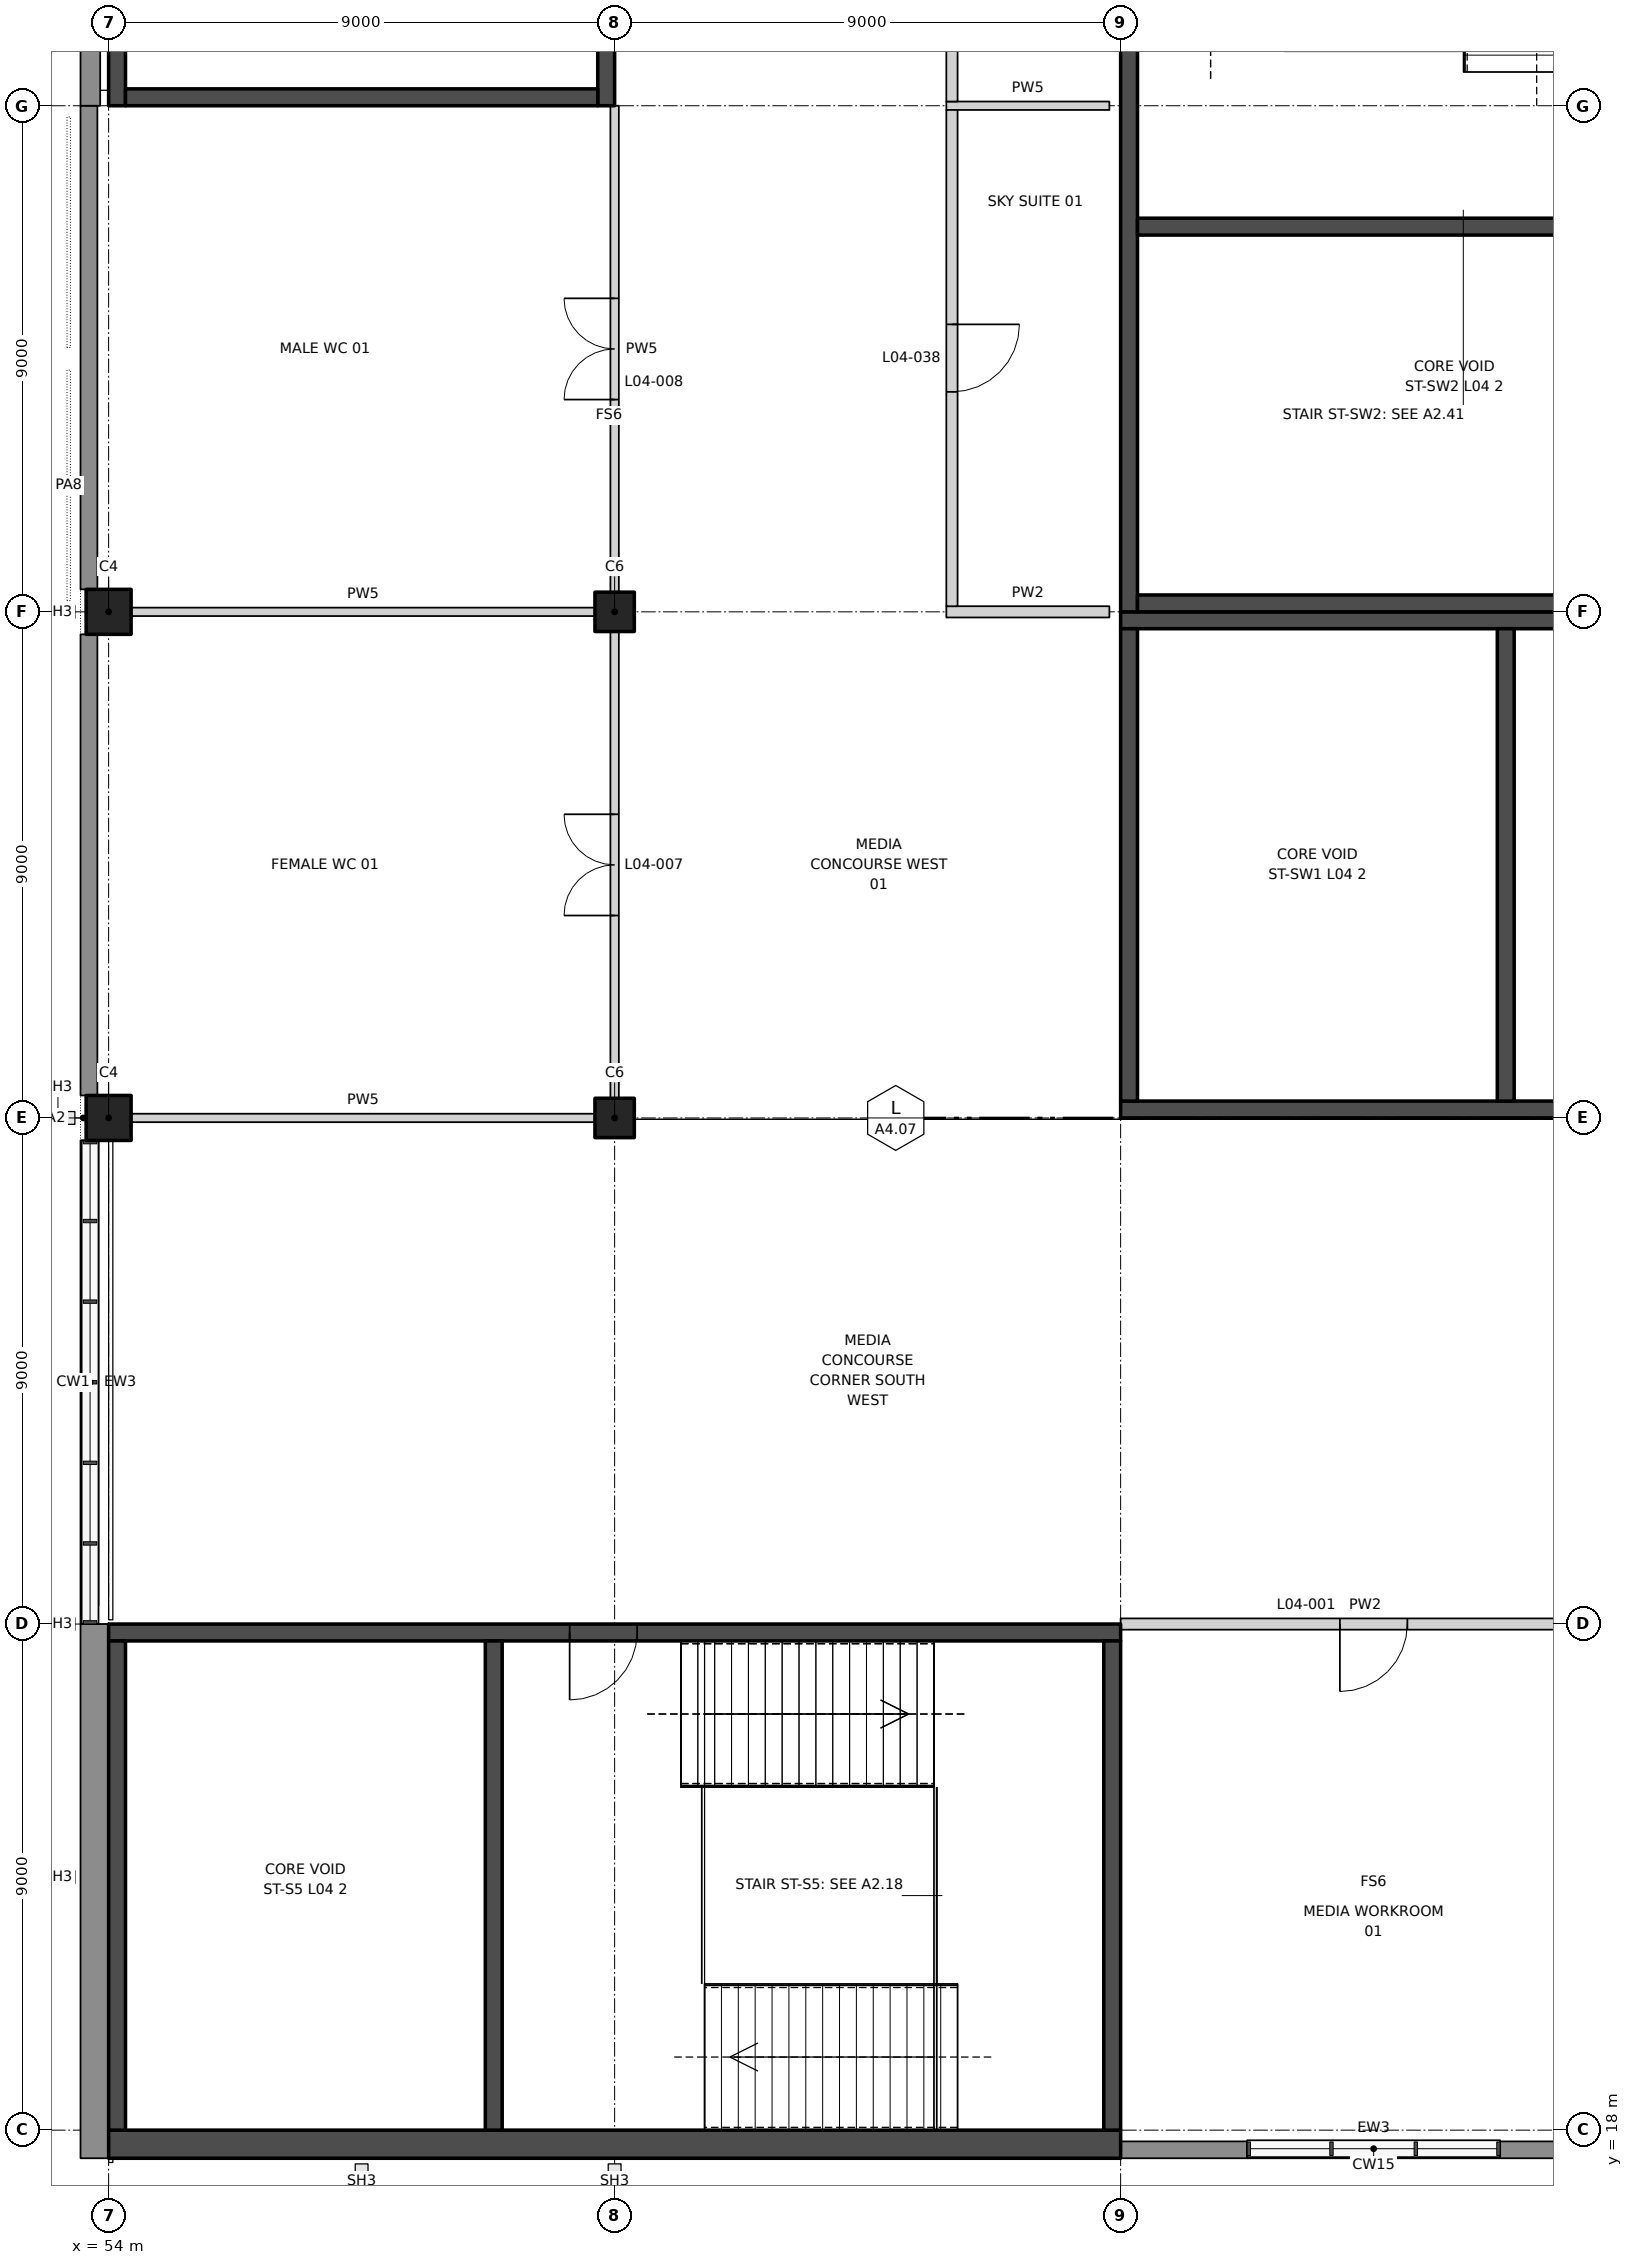
"""IFC4 building model, lengths in metres.
Left out: names, types, materials, properties, quantities, classifications, styles, units other than length and angle.
Written with IfcOpenShell. Run it as: python <this file> out.ifc"""

import sys

from ifc_helpers import new_model, si_unit, direction, frame, frame_2d, origin, origin_2d, place, context, subcontext, project, spatial, rectangle, extrude, element, fill, save


model = new_model("IFC4")
c1 = context("Model", 3, precision=1e-05, world=origin(), true_north=direction((0.0, 1.0)))
c2 = subcontext(c1, "Body", "Model", "MODEL_VIEW")
j1 = project(units=[si_unit("LENGTHUNIT", "METRE"), si_unit("PLANEANGLEUNIT", "RADIAN")], contexts=[c1])
p1 = place(None, origin())
s1 = spatial("IfcSite", under=j1, at=p1, CompositionType="ELEMENT")
p2 = place(p1, origin())
s2 = spatial("IfcBuilding", under=s1, at=p2, CompositionType="ELEMENT")
p3 = place(p2, frame((0.0, 0.0, 28.0)))
s3 = spatial("IfcBuildingStorey", under=s2, at=p3, CompositionType="ELEMENT", Elevation=28.0)
for number, where, z_axis, x_axis in (
    (1, (54.0, 36.0, 0.0), (0.0, 0.0, 1.0), (1.0, 0.0, 0.0)),
    (2, (54.0, 45.0, 0.0), (0.0, 0.0, 1.0), (1.0, 0.0, 0.0)),
):
    element("IfcColumn", number, at=place(p3, frame(where, z_axis=z_axis, x_axis=x_axis)), inside=s3, PredefinedType="COLUMN", context=c2, shape_type="SweptSolid", body=[
        extrude(rectangle(XDim=0.8, YDim=0.8, at=origin_2d()), origin(), (0.0, 0.0, 1.0), 5.5),
    ])
for number, where, z_axis, x_axis in (
    (3, (63.0, 36.0, 0.0), (0.0, 0.0, 1.0), (1.0, 0.0, 0.0)),
    (4, (63.0, 45.0, 0.0), (0.0, 0.0, 1.0), (1.0, 0.0, 0.0)),
):
    element("IfcColumn", number, at=place(p3, frame(where, z_axis=z_axis, x_axis=x_axis)), inside=s3, PredefinedType="COLUMN", context=c2, shape_type="SweptSolid", body=[
        extrude(rectangle(XDim=0.7, YDim=0.7, at=origin_2d()), origin(), (0.0, 0.0, 1.0), 5.5),
    ])
p4 = place(p3, frame((72.0, 27.0, 0.0), z_axis=(0.0, 0.0, 1.0), x_axis=(1.0, 0.0, 0.0)))
e5 = element("IfcWall", 5, at=p4, inside=s3, PredefinedType="PARTITIONING", context=c2, shape_type="SweptSolid", body=[
    extrude(rectangle(XDim=8.7, YDim=0.2, at=frame_2d((4.35, 0.0))), origin(), (0.0, 0.0, 1.0), 4.2),
])
p5 = place(p4, frame((3.9, 0.0, 0.0)))
e6 = element("IfcOpeningElement", 6, at=p5, cuts=e5, PredefinedType="OPENING", context=c2, shape_type="SweptSolid", body=[
    extrude(rectangle(XDim=1.2, YDim=2.1, at=frame_2d((0.6, 1.05))), frame((0.0, 0.11, 0.0), z_axis=(0.0, -1.0, 0.0), x_axis=(1.0, 0.0, 0.0)), (0.0, 0.0, 1.0), 0.22),
])
p6 = place(p3, frame((54.4, 36.0, 0.0), z_axis=(0.0, 0.0, 1.0), x_axis=(1.0, 0.0, 0.0)))
e7 = element("IfcWall", 7, at=p6, inside=s3, PredefinedType="PARTITIONING", context=c2, shape_type="SweptSolid", body=[
    extrude(rectangle(XDim=8.25, YDim=0.15, at=frame_2d((4.125, 0.0))), origin(), (0.0, 0.0, 1.0), 4.3),
])
p7 = place(p3, frame((54.4, 45.0, 0.0), z_axis=(0.0, 0.0, 1.0), x_axis=(1.0, 0.0, 0.0)))
e8 = element("IfcWall", 8, at=p7, inside=s3, PredefinedType="PARTITIONING", context=c2, shape_type="SweptSolid", body=[
    extrude(rectangle(XDim=8.25, YDim=0.15, at=frame_2d((4.125, 0.0))), origin(), (0.0, 0.0, 1.0), 9.5),
])
p8 = place(p3, frame((68.9, 45.0, 0.0), z_axis=(0.0, 0.0, 1.0), x_axis=(1.0, 0.0, 0.0)))
e9 = element("IfcWall", 9, at=p8, inside=s3, PredefinedType="PARTITIONING", context=c2, shape_type="SweptSolid", body=[
    extrude(rectangle(XDim=2.9, YDim=0.2, at=frame_2d((1.45, 0.0))), origin(), (0.0, 0.0, 1.0), 4.2),
])
p9 = place(p3, frame((68.9, 54.0, 0.0), z_axis=(0.0, 0.0, 1.0), x_axis=(1.0, 0.0, 0.0)))
e10 = element("IfcWall", 10, at=p9, inside=s3, PredefinedType="PARTITIONING", context=c2, shape_type="SweptSolid", body=[
    extrude(rectangle(XDim=2.9, YDim=0.15, at=frame_2d((1.45, 0.0))), origin(), (0.0, 0.0, 1.0), 4.2),
])
p10 = place(p3, frame((63.0, 36.35, 0.0), z_axis=(0.0, 0.0, 1.0), x_axis=(0.0, 1.0, 0.0)))
e11 = element("IfcWall", 11, at=p10, inside=s3, PredefinedType="PARTITIONING", context=c2, shape_type="SweptSolid", body=[
    extrude(rectangle(XDim=8.3, YDim=0.15, at=frame_2d((4.15, 0.0))), origin(), (0.0, 0.0, 1.0), 4.2),
])
p11 = place(p10, frame((3.25, 0.0, 0.0)))
e12 = element("IfcOpeningElement", 12, at=p11, cuts=e11, PredefinedType="OPENING", context=c2, shape_type="SweptSolid", body=[
    extrude(rectangle(XDim=1.8, YDim=2.1, at=frame_2d((0.9, 1.05))), frame((0.0, 0.085, 0.0), z_axis=(0.0, -1.0, 0.0), x_axis=(1.0, 0.0, 0.0)), (0.0, 0.0, 1.0), 0.17),
])
p12 = place(p3, frame((63.0, 45.35, 0.0), z_axis=(0.0, 0.0, 1.0), x_axis=(0.0, 1.0, 0.0)))
e13 = element("IfcWall", 13, at=p12, inside=s3, PredefinedType="PARTITIONING", context=c2, shape_type="SweptSolid", body=[
    extrude(rectangle(XDim=8.65, YDim=0.15, at=frame_2d((4.325, 0.0))), origin(), (0.0, 0.0, 1.0), 4.2),
])
p13 = place(p12, frame((3.425, 0.0, 0.0)))
e14 = element("IfcOpeningElement", 14, at=p13, cuts=e13, PredefinedType="OPENING", context=c2, shape_type="SweptSolid", body=[
    extrude(rectangle(XDim=1.8, YDim=2.1, at=frame_2d((0.9, 1.05))), frame((0.0, 0.085, 0.0), z_axis=(0.0, -1.0, 0.0), x_axis=(1.0, 0.0, 0.0)), (0.0, 0.0, 1.0), 0.17),
])
p14 = place(p3, frame((69.0, 45.1, 0.0), z_axis=(0.0, 0.0, 1.0), x_axis=(0.0, 1.0, 0.0)))
e15 = element("IfcWall", 15, at=p14, inside=s3, PredefinedType="PARTITIONING", context=c2, shape_type="SweptSolid", body=[
    extrude(rectangle(XDim=8.825, YDim=0.2, at=frame_2d((4.413, 0.0))), origin(), (0.0, 0.0, 1.0), 5.5),
])
p15 = place(p14, frame((3.812, 0.0, 0.0)))
e16 = element("IfcOpeningElement", 16, at=p15, cuts=e15, PredefinedType="OPENING", context=c2, shape_type="SweptSolid", body=[
    extrude(rectangle(XDim=1.2, YDim=2.1, at=frame_2d((0.6, 1.05))), frame((0.0, 0.11, 0.0), z_axis=(0.0, -1.0, 0.0), x_axis=(1.0, 0.0, 0.0)), (0.0, 0.0, 1.0), 0.22),
])
p16 = place(p3, frame((69.0, 54.075, 0.0), z_axis=(0.0, 0.0, 1.0), x_axis=(0.0, 1.0, 0.0)))
e17 = element("IfcWall", 17, at=p16, inside=s3, PredefinedType="PARTITIONING", context=c2, shape_type="SweptSolid", body=[
    extrude(rectangle(XDim=8.85, YDim=0.2, at=frame_2d((4.425, 0.0))), origin(), (0.0, 0.0, 1.0), 5.5),
])
p17 = place(p16, frame((3.825, 0.0, 0.0)))
e18 = element("IfcOpeningElement", 18, at=p17, cuts=e17, PredefinedType="OPENING", context=c2, shape_type="SweptSolid", body=[
    extrude(rectangle(XDim=1.2, YDim=2.1, at=frame_2d((0.6, 1.05))), frame((0.0, 0.11, 0.0), z_axis=(0.0, -1.0, 0.0), x_axis=(1.0, 0.0, 0.0)), (0.0, 0.0, 1.0), 0.22),
])
for number, where, z_axis, x_axis in (
    (19, (72.0, 17.65, 0.0), (0.0, 0.0, 1.0), (1.0, 0.0, 0.0)),
    (20, (78.75, 17.65, 0.0), (0.0, 0.0, 1.0), (1.0, 0.0, 0.0)),
):
    element("IfcWall", number, at=place(p3, frame(where, z_axis=z_axis, x_axis=x_axis)), inside=s3, PredefinedType="SOLIDWALL", context=c2, shape_type="SweptSolid", body=[
        extrude(rectangle(XDim=2.25, YDim=0.3, at=frame_2d((1.125, 0.0))), origin(), (0.0, 0.0, 1.0), 4.9),
    ])
p18 = place(p3, frame((74.25, 17.65, 0.0), z_axis=(0.0, 0.0, 1.0), x_axis=(1.0, 0.0, 0.0)))
e21 = element("IfcWall", 21, at=p18, inside=s3, PredefinedType="SOLIDWALL", context=c2, shape_type="SweptSolid", body=[
    extrude(rectangle(XDim=4.5, YDim=0.3, at=frame_2d((2.25, 0.0))), origin(), (0.0, 0.0, 1.0), 1.0),
])
p19 = place(p3, frame((53.75, 27.0, 0.0), z_axis=(0.0, 0.0, 1.0), x_axis=(0.0, -1.0, 0.0)))
e22 = element("IfcWall", 22, at=p19, inside=s3, PredefinedType="SOLIDWALL", context=c2, shape_type="SweptSolid", body=[
    extrude(rectangle(XDim=9.5, YDim=0.5, at=frame_2d((4.75, 0.0))), origin(), (0.0, 0.0, 1.0), 5.5),
])
p20 = place(p3, frame((53.65, 35.6, 0.0), z_axis=(0.0, 0.0, 1.0), x_axis=(0.0, -1.0, 0.0)))
e23 = element("IfcWall", 23, at=p20, inside=s3, PredefinedType="SOLIDWALL", context=c2, shape_type="SweptSolid", body=[
    extrude(rectangle(XDim=8.6, YDim=0.3, at=frame_2d((4.3, 0.0))), origin(), (0.0, 0.0, 1.0), 1.0),
])
p21 = place(p3, frame((53.65, 44.6, 0.0), z_axis=(0.0, 0.0, 1.0), x_axis=(0.0, -1.0, 0.0)))
e24 = element("IfcWall", 24, at=p21, inside=s3, PredefinedType="SOLIDWALL", context=c2, shape_type="SweptSolid", body=[
    extrude(rectangle(XDim=8.2, YDim=0.3, at=frame_2d((4.1, 0.0))), origin(), (0.0, 0.0, 1.0), 5.5),
])
p22 = place(p3, frame((53.65, 54.0, 0.0), z_axis=(0.0, 0.0, 1.0), x_axis=(0.0, -1.0, 0.0)))
e25 = element("IfcWall", 25, at=p22, inside=s3, PredefinedType="SOLIDWALL", context=c2, shape_type="SweptSolid", body=[
    extrude(rectangle(XDim=8.6, YDim=0.3, at=frame_2d((4.3, 0.0))), origin(), (0.0, 0.0, 1.0), 5.5),
])
p23 = place(p3, frame((53.675, 63.0, 0.0), z_axis=(0.0, 0.0, 1.0), x_axis=(0.0, -1.0, 0.0)))
e26 = element("IfcWall", 26, at=p23, inside=s3, PredefinedType="SOLIDWALL", context=c2, shape_type="SweptSolid", body=[
    extrude(rectangle(XDim=9.0, YDim=0.35, at=frame_2d((4.5, 0.0))), origin(), (0.0, 0.0, 1.0), 5.5),
])
p24 = place(p3, frame((72.0, 26.85, 0.0), z_axis=(0.0, 0.0, 1.0), x_axis=(-1.0, 0.0, 0.0)))
e27 = element("IfcWall", 27, at=p24, inside=s3, PredefinedType="SHEAR", context=c2, shape_type="SweptSolid", body=[
    extrude(rectangle(XDim=18.0, YDim=0.3, at=frame_2d((9.0, 0.0))), origin(), (0.0, 0.0, 1.0), 5.5),
])
p25 = place(p24, frame((8.6, 0.0, 0.0)))
e28 = element("IfcOpeningElement", 28, at=p25, cuts=e27, PredefinedType="OPENING", context=c2, shape_type="SweptSolid", body=[
    extrude(rectangle(XDim=1.2, YDim=2.1, at=frame_2d((0.6, 1.05))), frame((0.0, 0.16, 0.0), z_axis=(0.0, -1.0, 0.0), x_axis=(1.0, 0.0, 0.0)), (0.0, 0.0, 1.0), 0.32),
])
p26 = place(p3, frame((72.0, 17.75, 0.0), z_axis=(0.0, 0.0, 1.0), x_axis=(-1.0, 0.0, 0.0)))
e29 = element("IfcWall", 29, at=p26, inside=s3, PredefinedType="SHEAR", context=c2, shape_type="SweptSolid", body=[
    extrude(rectangle(XDim=18.0, YDim=0.5, at=frame_2d((9.0, 0.0))), origin(), (0.0, 0.0, 1.0), 5.5),
])
for number, where, z_axis, x_axis in (
    (30, (71.85, 26.7, 0.0), (0.0, 0.0, 1.0), (0.0, -1.0, 0.0)),
    (31, (54.15, 26.7, 0.0), (0.0, 0.0, 1.0), (0.0, -1.0, 0.0)),
    (32, (60.85, 26.7, 0.0), (0.0, 0.0, 1.0), (0.0, -1.0, 0.0)),
):
    element("IfcWall", number, at=place(p3, frame(where, z_axis=z_axis, x_axis=x_axis)), inside=s3, PredefinedType="SHEAR", context=c2, shape_type="SweptSolid", body=[
        extrude(rectangle(XDim=8.7, YDim=0.3, at=frame_2d((4.35, 0.0))), origin(), (0.0, 0.0, 1.0), 5.5),
    ])
p27 = place(p3, frame((62.85, 54.0, 0.0), z_axis=(0.0, 0.0, 1.0), x_axis=(0.0, 1.0, 0.0)))
e33 = element("IfcWall", 33, at=p27, inside=s3, PredefinedType="SHEAR", context=c2, shape_type="SweptSolid", body=[
    extrude(rectangle(XDim=18.0, YDim=0.3, at=frame_2d((9.0, 0.0))), origin(), (0.0, 0.0, 1.0), 5.5),
])
p28 = place(p27, frame((1.5, 0.0, 0.0)))
e34 = element("IfcOpeningElement", 34, at=p28, cuts=e33, PredefinedType="OPENING", context=c2, shape_type="SweptSolid", body=[
    extrude(rectangle(XDim=1.2, YDim=2.1, at=frame_2d((0.6, 1.05))), frame((0.0, 0.16, 0.0), z_axis=(0.0, -1.0, 0.0), x_axis=(1.0, 0.0, 0.0)), (0.0, 0.0, 1.0), 0.32),
])
p29 = place(p3, frame((54.15, 54.0, 0.0), z_axis=(0.0, 0.0, 1.0), x_axis=(0.0, 1.0, 0.0)))
e35 = element("IfcWall", 35, at=p29, inside=s3, PredefinedType="SHEAR", context=c2, shape_type="SweptSolid", body=[
    extrude(rectangle(XDim=18.0, YDim=0.3, at=frame_2d((9.0, 0.0))), origin(), (0.0, 0.0, 1.0), 5.5),
])
p30 = place(p3, frame((62.7, 54.15, 0.0), z_axis=(0.0, 0.0, 1.0), x_axis=(-1.0, 0.0, 0.0)))
e36 = element("IfcWall", 36, at=p30, inside=s3, PredefinedType="SHEAR", context=c2, shape_type="SweptSolid", body=[
    extrude(rectangle(XDim=8.4, YDim=0.3, at=frame_2d((4.2, 0.0))), origin(), (0.0, 0.0, 1.0), 5.5),
])
p31 = place(p3, frame((90.0, 44.85, 0.0), z_axis=(0.0, 0.0, 1.0), x_axis=(-1.0, 0.0, 0.0)))
e37 = element("IfcWall", 37, at=p31, inside=s3, PredefinedType="SHEAR", context=c2, shape_type="SweptSolid", body=[
    extrude(rectangle(XDim=18.0, YDim=0.3, at=frame_2d((9.0, 0.0))), origin(), (0.0, 0.0, 1.0), 5.5),
])
p32 = place(p31, frame((1.5, 0.0, 0.0)))
e38 = element("IfcOpeningElement", 38, at=p32, cuts=e37, PredefinedType="OPENING", context=c2, shape_type="SweptSolid", body=[
    extrude(rectangle(XDim=1.2, YDim=2.1, at=frame_2d((0.6, 1.05))), frame((0.0, 0.16, 0.0), z_axis=(0.0, -1.0, 0.0), x_axis=(1.0, 0.0, 0.0)), (0.0, 0.0, 1.0), 0.32),
])
p33 = place(p3, frame((90.0, 36.15, 0.0), z_axis=(0.0, 0.0, 1.0), x_axis=(-1.0, 0.0, 0.0)))
e39 = element("IfcWall", 39, at=p33, inside=s3, PredefinedType="SHEAR", context=c2, shape_type="SweptSolid", body=[
    extrude(rectangle(XDim=18.0, YDim=0.3, at=frame_2d((9.0, 0.0))), origin(), (0.0, 0.0, 1.0), 5.5),
])
for number, where, z_axis, x_axis in (
    (40, (72.15, 44.7, 0.0), (0.0, 0.0, 1.0), (0.0, -1.0, 0.0)),
    (41, (78.85, 44.7, 0.0), (0.0, 0.0, 1.0), (0.0, -1.0, 0.0)),
):
    element("IfcWall", number, at=place(p3, frame(where, z_axis=z_axis, x_axis=x_axis)), inside=s3, PredefinedType="SHEAR", context=c2, shape_type="SweptSolid", body=[
        extrude(rectangle(XDim=8.4, YDim=0.3, at=frame_2d((4.2, 0.0))), origin(), (0.0, 0.0, 1.0), 5.5),
    ])
p34 = place(p3, frame((72.15, 63.0, 0.0), z_axis=(0.0, 0.0, 1.0), x_axis=(0.0, -1.0, 0.0)))
e42 = element("IfcWall", 42, at=p34, inside=s3, PredefinedType="SHEAR", context=c2, shape_type="SweptSolid", body=[
    extrude(rectangle(XDim=18.0, YDim=0.3, at=frame_2d((9.0, 0.0))), origin(), (0.0, 0.0, 1.0), 5.5),
])
for number, where, z_axis, x_axis in (
    (43, (80.7, 45.15, 0.0), (0.0, 0.0, 1.0), (-1.0, 0.0, 0.0)),
    (44, (80.7, 51.85, 0.0), (0.0, 0.0, 1.0), (-1.0, 0.0, 0.0)),
):
    element("IfcWall", number, at=place(p3, frame(where, z_axis=z_axis, x_axis=x_axis)), inside=s3, PredefinedType="SHEAR", context=c2, shape_type="SweptSolid", body=[
        extrude(rectangle(XDim=8.4, YDim=0.3, at=frame_2d((4.2, 0.0))), origin(), (0.0, 0.0, 1.0), 5.5),
    ])
p35 = place(p5, frame((1.2, 0.0, 0.0), z_axis=(0.0, 0.0, 1.0), x_axis=(-1.0, 0.0, 0.0)))
e45 = element("IfcDoor", 45, at=p35, inside=s3, OperationType="SINGLE_SWING_RIGHT", PredefinedType="DOOR", context=c2, shape_type="SweptSolid", body=[
    extrude(rectangle(XDim=1.2, YDim=2.1, at=frame_2d((0.6, 1.05))), frame((0.0, 0.025, 0.0), z_axis=(0.0, -1.0, 0.0), x_axis=(1.0, 0.0, 0.0)), (0.0, 0.0, 1.0), 0.05),
])
fill(e6, e45)
p36 = place(p11, origin())
e46 = element("IfcDoor", 46, at=p36, inside=s3, OperationType="DOUBLE_DOOR_DOUBLE_SWING", PredefinedType="DOOR", context=c2, shape_type="SweptSolid", body=[
    extrude(rectangle(XDim=1.8, YDim=2.1, at=frame_2d((0.9, 1.05))), frame((0.0, 0.025, 0.0), z_axis=(0.0, -1.0, 0.0), x_axis=(1.0, 0.0, 0.0)), (0.0, 0.0, 1.0), 0.05),
])
fill(e12, e46)
p37 = place(p13, origin())
e47 = element("IfcDoor", 47, at=p37, inside=s3, OperationType="DOUBLE_DOOR_DOUBLE_SWING", PredefinedType="DOOR", context=c2, shape_type="SweptSolid", body=[
    extrude(rectangle(XDim=1.8, YDim=2.1, at=frame_2d((0.9, 1.05))), frame((0.0, 0.025, 0.0), z_axis=(0.0, -1.0, 0.0), x_axis=(1.0, 0.0, 0.0)), (0.0, 0.0, 1.0), 0.05),
])
fill(e14, e47)
p38 = place(p15, frame((1.2, 0.0, 0.0), z_axis=(0.0, 0.0, 1.0), x_axis=(-1.0, 0.0, 0.0)))
e48 = element("IfcDoor", 48, at=p38, inside=s3, OperationType="SINGLE_SWING_LEFT", PredefinedType="DOOR", context=c2, shape_type="SweptSolid", body=[
    extrude(rectangle(XDim=1.2, YDim=2.1, at=frame_2d((0.6, 1.05))), frame((0.0, 0.025, 0.0), z_axis=(0.0, -1.0, 0.0), x_axis=(1.0, 0.0, 0.0)), (0.0, 0.0, 1.0), 0.05),
])
fill(e16, e48)
p39 = place(p25, origin())
e49 = element("IfcDoor", 49, at=p39, inside=s3, OperationType="SINGLE_SWING_RIGHT", PredefinedType="DOOR", context=c2, shape_type="SweptSolid", body=[
    extrude(rectangle(XDim=1.2, YDim=2.1, at=frame_2d((0.6, 1.05))), frame((0.0, 0.025, 0.0), z_axis=(0.0, -1.0, 0.0), x_axis=(1.0, 0.0, 0.0)), (0.0, 0.0, 1.0), 0.05),
])
fill(e28, e49)
save(model, sys.argv[1])
